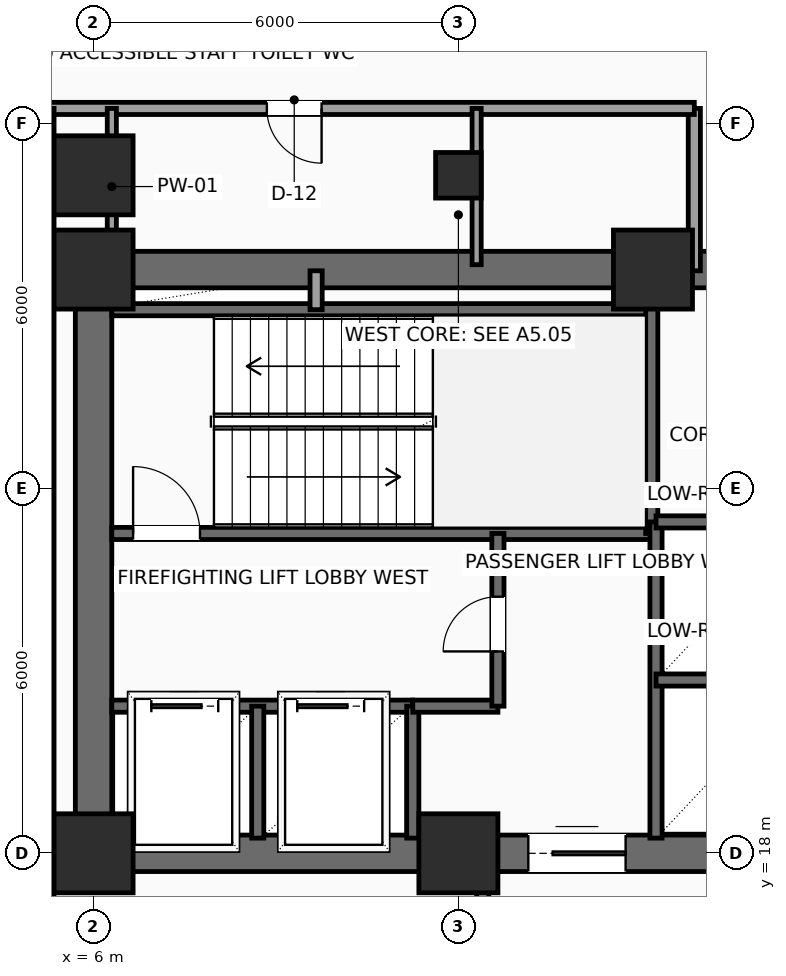
"""IFC4 building model, lengths in metres.
Left out: names, types, materials, properties, quantities, classifications, styles, units other than length and angle.
Written with IfcOpenShell. Run it as: python <this file> out.ifc"""

import sys

from ifc_helpers import new_model, si_unit, direction, frame, frame_2d, origin, origin_2d, place, context, subcontext, project, spatial, rectangle, hollow_rectangle, extrude, element, fill, save


model = new_model("IFC4")
c1 = context("Model", 3, precision=1e-05, world=origin(), true_north=direction((0.0, 1.0)))
c2 = subcontext(c1, "Body", "Model", "MODEL_VIEW")
j1 = project(units=[si_unit("LENGTHUNIT", "METRE"), si_unit("PLANEANGLEUNIT", "RADIAN")], contexts=[c1])
p1 = place(None, origin())
s1 = spatial("IfcSite", under=j1, at=p1, CompositionType="ELEMENT")
p2 = place(p1, origin())
s2 = spatial("IfcBuilding", under=s1, at=p2, CompositionType="ELEMENT")
p3 = place(p2, frame((0.0, 0.0, 87.0)))
s3 = spatial("IfcBuildingStorey", under=s2, at=p3, CompositionType="ELEMENT", Elevation=87.0)
for number, where, z_axis, x_axis in (
    (1, (6.0, 18.0, 0.0), (0.0, 0.0, 1.0), (1.0, 0.0, 0.0)),
    (2, (12.0, 18.0, 0.0), (0.0, 0.0, 1.0), (1.0, 0.0, 0.0)),
    (3, (6.0, 27.6, 0.0), (0.0, 0.0, 1.0), (1.0, 0.0, 0.0)),
    (4, (15.2, 27.6, 0.0), (0.0, 0.0, 1.0), (1.0, 0.0, 0.0)),
    (5, (6.0, 29.15, 0.0), (0.0, 0.0, 1.0), (1.0, 0.0, 0.0)),
):
    element("IfcColumn", number, at=place(p3, frame(where, z_axis=z_axis, x_axis=x_axis)), inside=s3, PredefinedType="COLUMN", context=c2, shape_type="SweptSolid", body=[
        extrude(rectangle(XDim=1.3, YDim=1.3, at=origin_2d()), origin(), (0.0, 0.0, 1.0), 3.9),
    ])
p4 = place(p3, frame((12.0, 29.15, 0.0), z_axis=(0.0, 0.0, 1.0), x_axis=(1.0, 0.0, 0.0)))
e6 = element("IfcColumn", 6, at=p4, inside=s3, PredefinedType="COLUMN", context=c2, shape_type="SweptSolid", body=[
    extrude(hollow_rectangle(XDim=0.75, YDim=0.75, WallThickness=0.035, InnerFilletRadius=0.035, OuterFilletRadius=0.05, at=origin_2d()), origin(), (0.0, 0.0, 1.0), 3.9),
])
p5 = place(p3, frame((6.0, 18.0, 0.0), z_axis=(0.0, 0.0, 1.0), x_axis=(1.0, 0.0, 0.0)))
e7 = element("IfcWall", 7, at=p5, inside=s3, PredefinedType="SHEAR", context=c2, shape_type="SweptSolid", body=[
    extrude(rectangle(XDim=12.0, YDim=0.6, at=frame_2d((6.0, 0.0))), origin(), (0.0, 0.0, 1.0), 3.65),
])
p6 = place(p5, frame((7.15, 0.0, 0.0)))
e8 = element("IfcOpeningElement", 8, at=p6, cuts=e7, PredefinedType="OPENING", context=c2, shape_type="SweptSolid", body=[
    extrude(rectangle(XDim=1.6, YDim=2.3, at=frame_2d((0.8, 1.15))), frame((0.0, 0.31, 0.0), z_axis=(0.0, -1.0, 0.0), x_axis=(1.0, 0.0, 0.0)), (0.0, 0.0, 1.0), 0.62),
])
p7 = place(p3, frame((6.0, 27.6, 0.0), z_axis=(0.0, 0.0, 1.0), x_axis=(1.0, 0.0, 0.0)))
e9 = element("IfcWall", 9, at=p7, inside=s3, PredefinedType="SHEAR", context=c2, shape_type="SweptSolid", body=[
    extrude(rectangle(XDim=12.0, YDim=0.6, at=frame_2d((6.0, 0.0))), origin(), (0.0, 0.0, 1.0), 3.65),
])
p8 = place(p7, frame((10.2, 0.0, 0.0)))
e10 = element("IfcOpeningElement", 10, at=p8, cuts=e9, PredefinedType="OPENING", context=c2, shape_type="SweptSolid", body=[
    extrude(rectangle(XDim=0.9, YDim=2.15, at=frame_2d((0.45, 1.075))), frame((0.0, 0.31, 0.0), z_axis=(0.0, -1.0, 0.0), x_axis=(1.0, 0.0, 0.0)), (0.0, 0.0, 1.0), 0.62),
])
p9 = place(p3, frame((6.0, 18.0, 0.0), z_axis=(0.0, 0.0, 1.0), x_axis=(0.0, 1.0, 0.0)))
e11 = element("IfcWall", 11, at=p9, inside=s3, PredefinedType="SHEAR", context=c2, shape_type="SweptSolid", body=[
    extrude(rectangle(XDim=9.6, YDim=0.6, at=frame_2d((4.8, 0.0))), origin(), (0.0, 0.0, 1.0), 3.65),
])
p10 = place(p3, frame((6.3, 23.26, 0.0), z_axis=(0.0, 0.0, 1.0), x_axis=(1.0, 0.0, 0.0)))
e12 = element("IfcWall", 12, at=p10, inside=s3, PredefinedType="SHEAR", context=c2, shape_type="SweptSolid", body=[
    extrude(rectangle(XDim=8.88, YDim=0.2, at=frame_2d((4.44, 0.0))), origin(), (0.0, 0.0, 1.0), 3.65),
])
p11 = place(p10, frame((0.35, 0.0, 0.0)))
e13 = element("IfcOpeningElement", 13, at=p11, cuts=e12, PredefinedType="OPENING", context=c2, shape_type="SweptSolid", body=[
    extrude(rectangle(XDim=1.1, YDim=2.2, at=frame_2d((0.55, 1.1))), frame((0.0, 0.11, 0.0), z_axis=(0.0, -1.0, 0.0), x_axis=(1.0, 0.0, 0.0)), (0.0, 0.0, 1.0), 0.22),
])
p12 = place(p3, frame((6.3, 26.94, 0.0), z_axis=(0.0, 0.0, 1.0), x_axis=(1.0, 0.0, 0.0)))
e14 = element("IfcWall", 14, at=p12, inside=s3, PredefinedType="SHEAR", context=c2, shape_type="SweptSolid", body=[
    extrude(rectangle(XDim=8.88, YDim=0.2, at=frame_2d((4.44, 0.0))), origin(), (0.0, 0.0, 1.0), 3.65),
])
p13 = place(p3, frame((15.18, 23.26, 0.0), z_axis=(0.0, 0.0, 1.0), x_axis=(0.0, 1.0, 0.0)))
e15 = element("IfcWall", 15, at=p13, inside=s3, PredefinedType="SHEAR", context=c2, shape_type="SweptSolid", body=[
    extrude(rectangle(XDim=4.04, YDim=0.2, at=frame_2d((2.02, 0.0))), origin(), (0.0, 0.0, 1.0), 3.65),
])
p14 = place(p3, frame((6.3, 20.42, 0.0), z_axis=(0.0, 0.0, 1.0), x_axis=(1.0, 0.0, 0.0)))
e16 = element("IfcWall", 16, at=p14, inside=s3, PredefinedType="SHEAR", context=c2, shape_type="SweptSolid", body=[
    extrude(rectangle(XDim=4.95, YDim=0.2, at=frame_2d((2.475, 0.0))), origin(), (0.0, 0.0, 1.0), 3.65),
])
p15 = place(p14, frame((0.65, 0.0, 0.0)))
e17 = element("IfcOpeningElement", 17, at=p15, cuts=e16, PredefinedType="OPENING", context=c2, shape_type="SweptSolid", body=[
    extrude(rectangle(XDim=1.1, YDim=2.2, at=frame_2d((0.55, 1.1))), frame((0.0, 0.11, 0.0), z_axis=(0.0, -1.0, 0.0), x_axis=(1.0, 0.0, 0.0)), (0.0, 0.0, 1.0), 0.22),
])
p16 = place(p14, frame((3.05, 0.0, 0.0)))
e18 = element("IfcOpeningElement", 18, at=p16, cuts=e16, PredefinedType="OPENING", context=c2, shape_type="SweptSolid", body=[
    extrude(rectangle(XDim=1.1, YDim=2.2, at=frame_2d((0.55, 1.1))), frame((0.0, 0.11, 0.0), z_axis=(0.0, -1.0, 0.0), x_axis=(1.0, 0.0, 0.0)), (0.0, 0.0, 1.0), 0.22),
])
for number, where, z_axis, x_axis in (
    (19, (8.7, 18.25, 0.0), (0.0, 0.0, 1.0), (0.0, 1.0, 0.0)),
    (20, (11.25, 18.25, 0.0), (0.0, 0.0, 1.0), (0.0, 1.0, 0.0)),
):
    element("IfcWall", number, at=place(p3, frame(where, z_axis=z_axis, x_axis=x_axis)), inside=s3, PredefinedType="SHEAR", context=c2, shape_type="SweptSolid", body=[
        extrude(rectangle(XDim=2.17, YDim=0.2, at=frame_2d((1.085, 0.0))), origin(), (0.0, 0.0, 1.0), 3.65),
    ])
p17 = place(p3, frame((11.25, 20.42, 0.0), z_axis=(0.0, 0.0, 1.0), x_axis=(1.0, 0.0, 0.0)))
e21 = element("IfcWall", 21, at=p17, inside=s3, PredefinedType="SHEAR", context=c2, shape_type="SweptSolid", body=[
    extrude(rectangle(XDim=1.4, YDim=0.2, at=frame_2d((0.7, 0.0))), origin(), (0.0, 0.0, 1.0), 3.65),
])
p18 = place(p3, frame((12.65, 20.42, 0.0), z_axis=(0.0, 0.0, 1.0), x_axis=(0.0, 1.0, 0.0)))
e22 = element("IfcWall", 22, at=p18, inside=s3, PredefinedType="SHEAR", context=c2, shape_type="SweptSolid", body=[
    extrude(rectangle(XDim=2.84, YDim=0.2, at=frame_2d((1.42, 0.0))), origin(), (0.0, 0.0, 1.0), 3.65),
])
p19 = place(p18, frame((0.9, 0.0, 0.0)))
e23 = element("IfcOpeningElement", 23, at=p19, cuts=e22, PredefinedType="OPENING", context=c2, shape_type="SweptSolid", body=[
    extrude(rectangle(XDim=0.9, YDim=2.15, at=frame_2d((0.45, 1.075))), frame((0.0, 0.11, 0.0), z_axis=(0.0, -1.0, 0.0), x_axis=(1.0, 0.0, 0.0)), (0.0, 0.0, 1.0), 0.22),
])
p20 = place(p3, frame((9.66, 26.94, 0.0), z_axis=(0.0, 0.0, 1.0), x_axis=(0.0, 1.0, 0.0)))
e24 = element("IfcWall", 24, at=p20, inside=s3, PredefinedType="SOLIDWALL", context=c2, shape_type="SweptSolid", body=[
    extrude(rectangle(XDim=0.64, YDim=0.2, at=frame_2d((0.32, 0.0))), origin(), (0.0, 0.0, 1.0), 3.65),
])
p21 = place(p3, frame((15.25, 18.25, 0.0), z_axis=(0.0, 0.0, 1.0), x_axis=(0.0, 1.0, 0.0)))
e25 = element("IfcWall", 25, at=p21, inside=s3, PredefinedType="SHEAR", context=c2, shape_type="SweptSolid", body=[
    extrude(rectangle(XDim=5.2, YDim=0.2, at=frame_2d((2.6, 0.0))), origin(), (0.0, 0.0, 1.0), 3.65),
])
p22 = place(p3, frame((15.25, 20.85, 0.0), z_axis=(0.0, 0.0, 1.0), x_axis=(1.0, 0.0, 0.0)))
e26 = element("IfcWall", 26, at=p22, inside=s3, PredefinedType="SHEAR", context=c2, shape_type="SweptSolid", body=[
    extrude(rectangle(XDim=2.4, YDim=0.2, at=frame_2d((1.2, 0.0))), origin(), (0.0, 0.0, 1.0), 3.65),
])
p23 = place(p3, frame((15.25, 23.45, 0.0), z_axis=(0.0, 0.0, 1.0), x_axis=(1.0, 0.0, 0.0)))
e27 = element("IfcWall", 27, at=p23, inside=s3, PredefinedType="SHEAR", context=c2, shape_type="SweptSolid", body=[
    extrude(rectangle(XDim=2.45, YDim=0.2, at=frame_2d((1.225, 0.0))), origin(), (0.0, 0.0, 1.0), 3.65),
])
p24 = place(p3, frame((15.88, 27.58, 0.0), z_axis=(0.0, 0.0, 1.0), x_axis=(0.0, 1.0, 0.0)))
e28 = element("IfcWall", 28, at=p24, inside=s3, PredefinedType="SOLIDWALL", context=c2, shape_type="SweptSolid", body=[
    extrude(rectangle(XDim=2.67, YDim=0.2, at=frame_2d((1.335, 0.0))), origin(), (0.0, 0.0, 1.0), 3.65),
])
p25 = place(p3, frame((15.88, 30.25, 0.0), z_axis=(0.0, 0.0, 1.0), x_axis=(-1.0, 0.0, 0.0)))
e29 = element("IfcWall", 29, at=p25, inside=s3, PredefinedType="SOLIDWALL", context=c2, shape_type="SweptSolid", body=[
    extrude(rectangle(XDim=10.63, YDim=0.2, at=frame_2d((5.315, 0.0))), origin(), (0.0, 0.0, 1.0), 3.65),
])
p26 = place(p25, frame((6.13, 0.0, 0.0)))
e30 = element("IfcOpeningElement", 30, at=p26, cuts=e29, PredefinedType="OPENING", context=c2, shape_type="SweptSolid", body=[
    extrude(rectangle(XDim=0.9, YDim=2.1, at=frame_2d((0.45, 1.05))), frame((0.0, 0.11, 0.0), z_axis=(0.0, -1.0, 0.0), x_axis=(1.0, 0.0, 0.0)), (0.0, 0.0, 1.0), 0.22),
])
p27 = place(p3, frame((5.25, 30.25, 0.0), z_axis=(0.0, 0.0, 1.0), x_axis=(0.0, -1.0, 0.0)))
e31 = element("IfcWall", 31, at=p27, inside=s3, PredefinedType="SOLIDWALL", context=c2, shape_type="SweptSolid", body=[
    extrude(rectangle(XDim=13.35, YDim=0.2, at=frame_2d((6.675, 0.0))), origin(), (0.0, 0.0, 1.0), 3.65),
])
p28 = place(p3, frame((12.4, 16.9, 0.0), z_axis=(0.0, 0.0, 1.0), x_axis=(0.0, 1.0, 0.0)))
e32 = element("IfcWall", 32, at=p28, inside=s3, PredefinedType="SOLIDWALL", context=c2, shape_type="SweptSolid", body=[
    extrude(rectangle(XDim=1.05, YDim=0.2, at=frame_2d((0.525, 0.0))), origin(), (0.0, 0.0, 1.0), 3.65),
])
for number, where, z_axis, x_axis in (
    (33, (6.3, 27.68, 0.0), (0.0, 0.0, 1.0), (0.0, 1.0, 0.0)),
    (34, (12.3, 27.68, 0.0), (0.0, 0.0, 1.0), (0.0, 1.0, 0.0)),
):
    element("IfcWall", number, at=place(p3, frame(where, z_axis=z_axis, x_axis=x_axis)), inside=s3, PredefinedType="PARTITIONING", context=c2, shape_type="SweptSolid", body=[
        extrude(rectangle(XDim=2.57, YDim=0.15, at=frame_2d((1.285, 0.0))), origin(), (0.0, 0.0, 1.0), 2.992),
    ])
p29 = place(p6, origin())
e35 = element("IfcDoor", 35, at=p29, inside=s3, OperationType="DOUBLE_DOOR_SLIDING", PredefinedType="DOOR", context=c2, shape_type="SweptSolid", body=[
    extrude(rectangle(XDim=1.6, YDim=2.3, at=frame_2d((0.8, 1.15))), frame((0.0, 0.025, 0.0), z_axis=(0.0, -1.0, 0.0), x_axis=(1.0, 0.0, 0.0)), (0.0, 0.0, 1.0), 0.05),
])
fill(e8, e35)
p30 = place(p11, origin())
e36 = element("IfcDoor", 36, at=p30, inside=s3, OperationType="SINGLE_SWING_LEFT", PredefinedType="DOOR", context=c2, shape_type="SweptSolid", body=[
    extrude(rectangle(XDim=1.1, YDim=2.2, at=frame_2d((0.55, 1.1))), frame((0.0, 0.025, 0.0), z_axis=(0.0, -1.0, 0.0), x_axis=(1.0, 0.0, 0.0)), (0.0, 0.0, 1.0), 0.05),
])
fill(e13, e36)
p31 = place(p15, origin())
e37 = element("IfcDoor", 37, at=p31, inside=s3, OperationType="SLIDING_TO_LEFT", PredefinedType="DOOR", context=c2, shape_type="SweptSolid", body=[
    extrude(rectangle(XDim=1.1, YDim=2.2, at=frame_2d((0.55, 1.1))), frame((0.0, 0.025, 0.0), z_axis=(0.0, -1.0, 0.0), x_axis=(1.0, 0.0, 0.0)), (0.0, 0.0, 1.0), 0.05),
])
fill(e17, e37)
p32 = place(p16, origin())
e38 = element("IfcDoor", 38, at=p32, inside=s3, OperationType="SLIDING_TO_LEFT", PredefinedType="DOOR", context=c2, shape_type="SweptSolid", body=[
    extrude(rectangle(XDim=1.1, YDim=2.2, at=frame_2d((0.55, 1.1))), frame((0.0, 0.025, 0.0), z_axis=(0.0, -1.0, 0.0), x_axis=(1.0, 0.0, 0.0)), (0.0, 0.0, 1.0), 0.05),
])
fill(e18, e38)
p33 = place(p19, origin())
e39 = element("IfcDoor", 39, at=p33, inside=s3, OperationType="SINGLE_SWING_LEFT", PredefinedType="DOOR", context=c2, shape_type="SweptSolid", body=[
    extrude(rectangle(XDim=0.9, YDim=2.15, at=frame_2d((0.45, 1.075))), frame((0.0, 0.025, 0.0), z_axis=(0.0, -1.0, 0.0), x_axis=(1.0, 0.0, 0.0)), (0.0, 0.0, 1.0), 0.05),
])
fill(e23, e39)
p34 = place(p26, origin())
e40 = element("IfcDoor", 40, at=p34, inside=s3, OperationType="SINGLE_SWING_LEFT", PredefinedType="DOOR", context=c2, shape_type="SweptSolid", body=[
    extrude(rectangle(XDim=0.9, YDim=2.1, at=frame_2d((0.45, 1.05))), frame((0.0, 0.025, 0.0), z_axis=(0.0, -1.0, 0.0), x_axis=(1.0, 0.0, 0.0)), (0.0, 0.0, 1.0), 0.05),
])
fill(e30, e40)
save(model, sys.argv[1])
